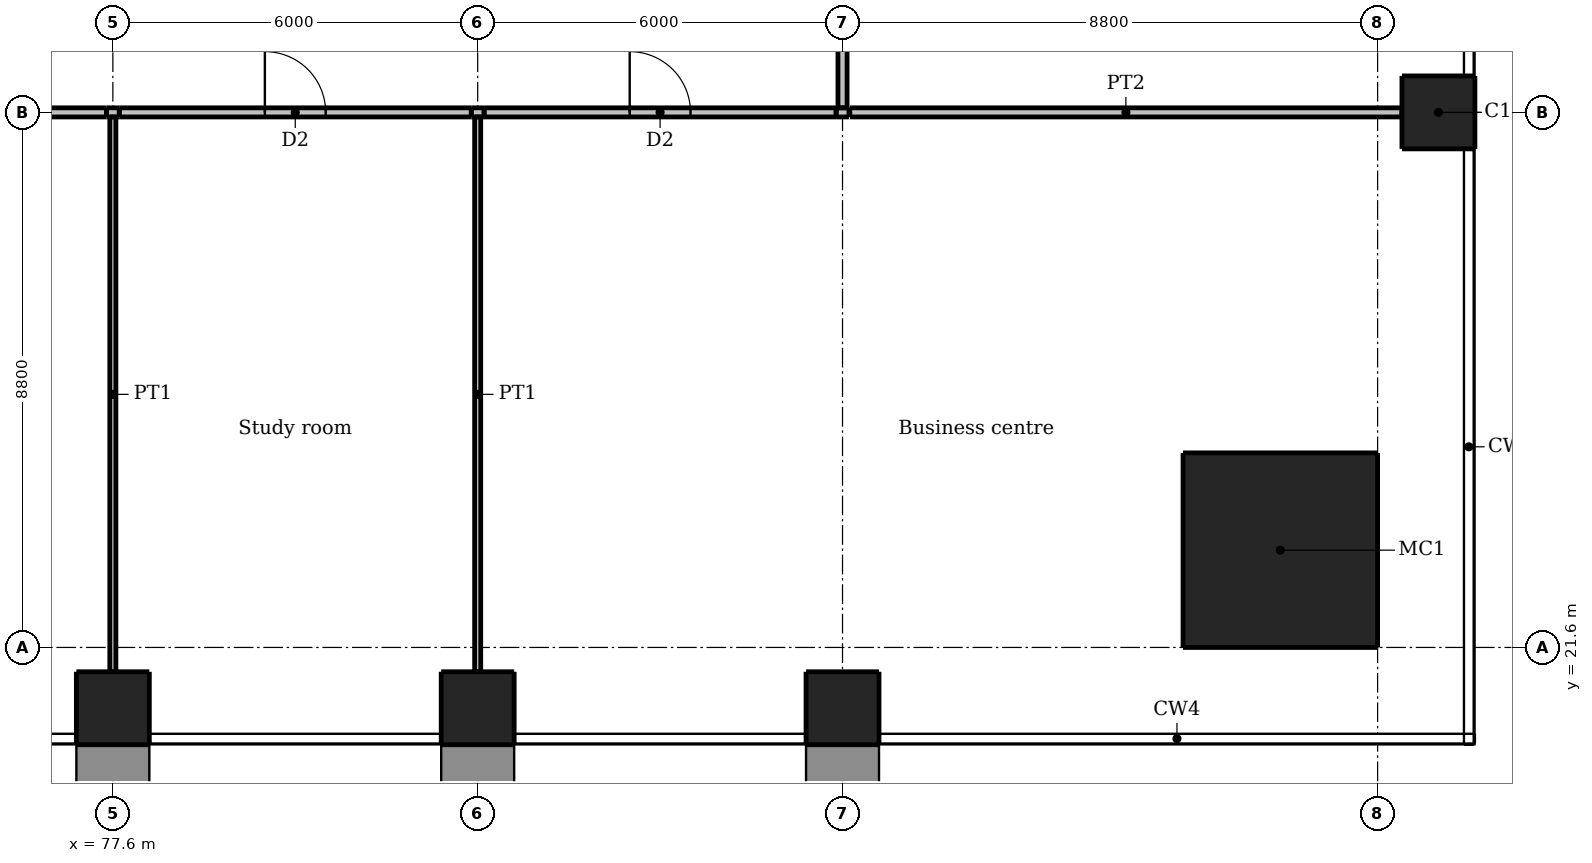
"""IFC4 building model, lengths in metres.
Left out: names, types, materials, properties, quantities, classifications, styles, units other than length and angle.
Written with IfcOpenShell. Run it as: python <this file> out.ifc"""

import sys

from ifc_helpers import new_model, si_unit, direction, frame, frame_2d, origin, origin_2d, place, context, subcontext, project, spatial, rectangle, extrude, element, fill, save


model = new_model("IFC4")
c1 = context("Model", 3, precision=1e-05, world=origin(), true_north=direction((0.0, 1.0)))
c2 = subcontext(c1, "Body", "Model", "MODEL_VIEW")
j1 = project(units=[si_unit("LENGTHUNIT", "METRE"), si_unit("PLANEANGLEUNIT", "RADIAN")], contexts=[c1])
p1 = place(None, origin())
s1 = spatial("IfcSite", under=j1, at=p1, CompositionType="ELEMENT")
p2 = place(p1, origin())
s2 = spatial("IfcBuilding", under=s1, at=p2, CompositionType="ELEMENT")
p3 = place(p2, frame((0.0, 0.0, 14.5)))
s3 = spatial("IfcBuildingStorey", under=s2, at=p3, CompositionType="ELEMENT", Elevation=14.5)
for number, where, z_axis, x_axis in (
    (1, (77.6, 20.6, 0.0), (0.0, 0.0, 1.0), (1.0, 0.0, 0.0)),
    (2, (83.6, 20.6, 0.0), (0.0, 0.0, 1.0), (1.0, 0.0, 0.0)),
    (3, (89.6, 20.6, 0.0), (0.0, 0.0, 1.0), (1.0, 0.0, 0.0)),
    (4, (99.4, 30.4, 0.0), (0.0, 0.0, 1.0), (1.0, 0.0, 0.0)),
):
    element("IfcColumn", number, at=place(p3, frame(where, z_axis=z_axis, x_axis=x_axis)), inside=s3, PredefinedType="COLUMN", context=c2, shape_type="SweptSolid", body=[
        extrude(rectangle(XDim=1.2, YDim=1.2, at=origin_2d()), origin(), (0.0, 0.0, 1.0), 4.2),
    ])
p4 = place(p3, frame((96.8, 23.2, 0.0), z_axis=(0.0, 0.0, 1.0), x_axis=(1.0, 0.0, 0.0)))
e5 = element("IfcColumn", 5, at=p4, inside=s3, PredefinedType="COLUMN", context=c2, shape_type="SweptSolid", body=[
    extrude(rectangle(XDim=3.2, YDim=3.2, at=origin_2d()), origin(), (0.0, 0.0, 1.0), 4.2),
])
p5 = place(p3, frame((71.705, 30.4, 0.0), z_axis=(0.0, 0.0, 1.0), x_axis=(1.0, 0.0, 0.0)))
e6 = element("IfcWall", 6, at=p5, inside=s3, PredefinedType="PARTITIONING", context=c2, shape_type="SweptSolid", body=[
    extrude(rectangle(XDim=5.789, YDim=0.15, at=frame_2d((2.895, 0.0))), origin(), (0.0, 0.0, 1.0), 4.2),
])
p6 = place(p3, frame((77.495, 30.4, 0.0), z_axis=(0.0, 0.0, 1.0), x_axis=(1.0, 0.0, 0.0)))
e7 = element("IfcWall", 7, at=p6, inside=s3, PredefinedType="PARTITIONING", context=c2, shape_type="SweptSolid", body=[
    extrude(rectangle(XDim=0.211, YDim=0.15, at=frame_2d((0.105, 0.0))), origin(), (0.0, 0.0, 1.0), 3.661),
])
p7 = place(p3, frame((77.705, 30.4, 0.0), z_axis=(0.0, 0.0, 1.0), x_axis=(1.0, 0.0, 0.0)))
e8 = element("IfcWall", 8, at=p7, inside=s3, PredefinedType="PARTITIONING", context=c2, shape_type="SweptSolid", body=[
    extrude(rectangle(XDim=5.789, YDim=0.15, at=frame_2d((2.895, 0.0))), origin(), (0.0, 0.0, 1.0), 4.2),
])
p8 = place(p7, frame((2.395, 0.0, 0.0)))
e9 = element("IfcOpeningElement", 9, at=p8, cuts=e8, PredefinedType="OPENING", context=c2, shape_type="SweptSolid", body=[
    extrude(rectangle(XDim=1.0, YDim=2.1, at=frame_2d((0.5, 1.05))), frame((0.0, 0.085, 0.0), z_axis=(0.0, -1.0, 0.0), x_axis=(1.0, 0.0, 0.0)), (0.0, 0.0, 1.0), 0.17),
])
p9 = place(p3, frame((83.495, 30.4, 0.0), z_axis=(0.0, 0.0, 1.0), x_axis=(1.0, 0.0, 0.0)))
e10 = element("IfcWall", 10, at=p9, inside=s3, PredefinedType="PARTITIONING", context=c2, shape_type="SweptSolid", body=[
    extrude(rectangle(XDim=0.211, YDim=0.15, at=frame_2d((0.105, 0.0))), origin(), (0.0, 0.0, 1.0), 3.661),
])
p10 = place(p3, frame((83.705, 30.4, 0.0), z_axis=(0.0, 0.0, 1.0), x_axis=(1.0, 0.0, 0.0)))
e11 = element("IfcWall", 11, at=p10, inside=s3, PredefinedType="PARTITIONING", context=c2, shape_type="SweptSolid", body=[
    extrude(rectangle(XDim=5.789, YDim=0.15, at=frame_2d((2.895, 0.0))), origin(), (0.0, 0.0, 1.0), 4.2),
])
p11 = place(p10, frame((2.395, 0.0, 0.0)))
e12 = element("IfcOpeningElement", 12, at=p11, cuts=e11, PredefinedType="OPENING", context=c2, shape_type="SweptSolid", body=[
    extrude(rectangle(XDim=1.0, YDim=2.1, at=frame_2d((0.5, 1.05))), frame((0.0, 0.085, 0.0), z_axis=(0.0, -1.0, 0.0), x_axis=(1.0, 0.0, 0.0)), (0.0, 0.0, 1.0), 0.17),
])
p12 = place(p3, frame((89.495, 30.4, 0.0), z_axis=(0.0, 0.0, 1.0), x_axis=(1.0, 0.0, 0.0)))
e13 = element("IfcWall", 13, at=p12, inside=s3, PredefinedType="PARTITIONING", context=c2, shape_type="SweptSolid", body=[
    extrude(rectangle(XDim=0.211, YDim=0.15, at=frame_2d((0.105, 0.0))), origin(), (0.0, 0.0, 1.0), 3.661),
])
p13 = place(p3, frame((89.72, 30.4, 0.0), z_axis=(0.0, 0.0, 1.0), x_axis=(1.0, 0.0, 0.0)))
e14 = element("IfcWall", 14, at=p13, inside=s3, PredefinedType="PARTITIONING", context=c2, shape_type="SweptSolid", body=[
    extrude(rectangle(XDim=9.08, YDim=0.15, at=frame_2d((4.54, 0.0))), origin(), (0.0, 0.0, 1.0), 3.667),
])
for number, where, z_axis, x_axis in (
    (15, (77.6, 21.2, 0.0), (0.0, 0.0, 1.0), (0.0, 1.0, 0.0)),
    (16, (83.6, 21.2, 0.0), (0.0, 0.0, 1.0), (0.0, 1.0, 0.0)),
):
    element("IfcWall", number, at=place(p3, frame(where, z_axis=z_axis, x_axis=x_axis)), inside=s3, PredefinedType="PARTITIONING", context=c2, shape_type="SweptSolid", body=[
        extrude(rectangle(XDim=9.125, YDim=0.1, at=frame_2d((4.562, 0.0))), origin(), (0.0, 0.0, 1.0), 3.661),
    ])
p14 = place(p3, frame((89.6, 30.475, 0.0), z_axis=(0.0, 0.0, 1.0), x_axis=(0.0, 1.0, 0.0)))
e17 = element("IfcWall", 17, at=p14, inside=s3, PredefinedType="PARTITIONING", context=c2, shape_type="SweptSolid", body=[
    extrude(rectangle(XDim=5.82, YDim=0.15, at=frame_2d((2.91, 0.0))), origin(), (0.0, 0.0, 1.0), 3.661),
])
p15 = place(p8, origin())
e18 = element("IfcDoor", 18, at=p15, inside=s3, OperationType="SINGLE_SWING_LEFT", PredefinedType="DOOR", context=c2, shape_type="SweptSolid", body=[
    extrude(rectangle(XDim=1.0, YDim=2.1, at=frame_2d((0.5, 1.05))), frame((0.0, 0.025, 0.0), z_axis=(0.0, -1.0, 0.0), x_axis=(1.0, 0.0, 0.0)), (0.0, 0.0, 1.0), 0.05),
])
fill(e9, e18)
p16 = place(p11, origin())
e19 = element("IfcDoor", 19, at=p16, inside=s3, OperationType="SINGLE_SWING_LEFT", PredefinedType="DOOR", context=c2, shape_type="SweptSolid", body=[
    extrude(rectangle(XDim=1.0, YDim=2.1, at=frame_2d((0.5, 1.05))), frame((0.0, 0.025, 0.0), z_axis=(0.0, -1.0, 0.0), x_axis=(1.0, 0.0, 0.0)), (0.0, 0.0, 1.0), 0.05),
])
fill(e12, e19)
save(model, sys.argv[1])
